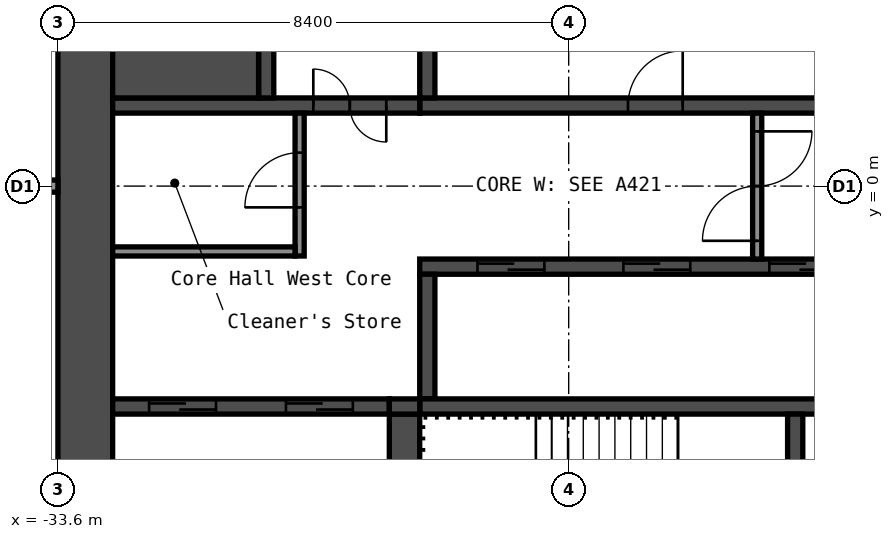
"""IFC4 building model, lengths in metres.
Left out: names, types, materials, properties, quantities, classifications, styles, units other than length and angle.
Written with IfcOpenShell. Run it as: python <this file> out.ifc"""

import sys

from ifc_helpers import new_model, si_unit, direction, frame, frame_2d, origin, place, context, subcontext, project, spatial, rectangle, extrude, element, fill, save


model = new_model("IFC4")
c1 = context("Model", 3, precision=1e-05, world=origin(), true_north=direction((0.0, 1.0)))
c2 = subcontext(c1, "Body", "Model", "MODEL_VIEW")
j1 = project(units=[si_unit("LENGTHUNIT", "METRE"), si_unit("PLANEANGLEUNIT", "RADIAN")], contexts=[c1])
p1 = place(None, origin())
s1 = spatial("IfcSite", under=j1, at=p1, CompositionType="ELEMENT")
p2 = place(p1, origin())
s2 = spatial("IfcBuilding", under=s1, at=p2, CompositionType="ELEMENT")
p3 = place(p2, frame((0.0, 0.0, 137.4)))
s3 = spatial("IfcBuildingStorey", under=s2, at=p3, CompositionType="ELEMENT", Elevation=137.4)
p4 = place(p3, frame((-33.15, -8.4, 0.0), z_axis=(0.0, 0.0, 1.0), x_axis=(0.0, 1.0, 0.0)))
e1 = element("IfcWall", 1, at=p4, inside=s3, PredefinedType="SHEAR", context=c2, shape_type="SweptSolid", body=[
    extrude(rectangle(XDim=16.8, YDim=0.9, at=frame_2d((8.4, 0.0))), origin(), (0.0, 0.0, 1.0), 2.75),
])
p5 = place(p3, frame((-27.65, 1.325, 0.0), z_axis=(0.0, 0.0, 1.0), x_axis=(1.0, 0.0, 0.0)))
e2 = element("IfcWall", 2, at=p5, inside=s3, PredefinedType="SHEAR", context=c2, shape_type="SweptSolid", body=[
    extrude(rectangle(XDim=7.5, YDim=0.25, at=frame_2d((3.75, 0.0))), origin(), (0.0, 0.0, 1.0), 2.75),
])
p6 = place(p5, frame((3.425, 0.0, 0.0)))
e3 = element("IfcOpeningElement", 3, at=p6, cuts=e2, PredefinedType="OPENING", context=c2, shape_type="SweptSolid", body=[
    extrude(rectangle(XDim=0.9, YDim=2.1, at=frame_2d((0.45, 1.05))), frame((0.0, 0.135, 0.0), z_axis=(0.0, -1.0, 0.0), x_axis=(1.0, 0.0, 0.0)), (0.0, 0.0, 1.0), 0.27),
])
p7 = place(p3, frame((-27.525, 1.45, 0.0), z_axis=(0.0, 0.0, 1.0), x_axis=(0.0, 1.0, 0.0)))
e4 = element("IfcWall", 4, at=p7, inside=s3, PredefinedType="SHEAR", context=c2, shape_type="SweptSolid", body=[
    extrude(rectangle(XDim=2.05, YDim=0.25, at=frame_2d((1.025, 0.0))), origin(), (0.0, 0.0, 1.0), 2.75),
])
p8 = place(p3, frame((-32.7, 1.325, 0.0), z_axis=(0.0, 0.0, 1.0), x_axis=(1.0, 0.0, 0.0)))
e5 = element("IfcWall", 5, at=p8, inside=s3, PredefinedType="SHEAR", context=c2, shape_type="SweptSolid", body=[
    extrude(rectangle(XDim=5.05, YDim=0.25, at=frame_2d((2.525, 0.0))), origin(), (0.0, 0.0, 1.0), 2.75),
])
p9 = place(p8, frame((3.3, 0.0, 0.0)))
e6 = element("IfcOpeningElement", 6, at=p9, cuts=e5, PredefinedType="OPENING", context=c2, shape_type="SweptSolid", body=[
    extrude(rectangle(XDim=1.2, YDim=2.1, at=frame_2d((0.6, 1.05))), frame((0.0, 0.135, 0.0), z_axis=(0.0, -1.0, 0.0), x_axis=(1.0, 0.0, 0.0)), (0.0, 0.0, 1.0), 0.27),
])
p10 = place(p3, frame((-30.175, 1.45, 0.0), z_axis=(0.0, 0.0, 1.0), x_axis=(0.0, 1.0, 0.0)))
e7 = element("IfcWall", 7, at=p10, inside=s3, PredefinedType="SHEAR", context=c2, shape_type="SweptSolid", body=[
    extrude(rectangle(XDim=6.05, YDim=0.25, at=frame_2d((3.025, 0.0))), origin(), (0.0, 0.0, 1.0), 2.75),
])
p11 = place(p10, frame((2.625, 0.0, 0.0)))
e8 = element("IfcOpeningElement", 8, at=p11, cuts=e7, PredefinedType="OPENING", context=c2, shape_type="SweptSolid", body=[
    extrude(rectangle(XDim=1.1, YDim=2.1, at=frame_2d((0.55, 1.05))), frame((0.0, 0.135, 0.0), z_axis=(0.0, -1.0, 0.0), x_axis=(1.0, 0.0, 0.0)), (0.0, 0.0, 1.0), 0.27),
])
p12 = place(p3, frame((-32.7, 2.375, 0.0), z_axis=(0.0, 0.0, 1.0), x_axis=(1.0, 0.0, 0.0)))
e9 = element("IfcWall", 9, at=p12, inside=s3, PredefinedType="SHEAR", context=c2, shape_type="SweptSolid", body=[
    extrude(rectangle(XDim=2.4, YDim=1.85, at=frame_2d((1.2, 0.0))), origin(), (0.0, 0.0, 1.0), 2.75),
])
p13 = place(p3, frame((-27.65, -1.325, 0.0), z_axis=(0.0, 0.0, 1.0), x_axis=(1.0, 0.0, 0.0)))
e10 = element("IfcWall", 10, at=p13, inside=s3, PredefinedType="SHEAR", context=c2, shape_type="SweptSolid", body=[
    extrude(rectangle(XDim=7.5, YDim=0.25, at=frame_2d((3.75, 0.0))), origin(), (0.0, 0.0, 1.0), 2.75),
])
p14 = place(p13, frame((5.75, 0.0, 0.0)))
e11 = element("IfcOpeningElement", 11, at=p14, cuts=e10, PredefinedType="OPENING", context=c2, shape_type="SweptSolid", body=[
    extrude(rectangle(XDim=1.1, YDim=2.1, at=frame_2d((0.55, 1.05))), frame((0.0, 0.135, 0.0), z_axis=(0.0, -1.0, 0.0), x_axis=(1.0, 0.0, 0.0)), (0.0, 0.0, 1.0), 0.27),
])
p15 = place(p13, frame((3.35, 0.0, 0.0)))
e12 = element("IfcOpeningElement", 12, at=p15, cuts=e10, PredefinedType="OPENING", context=c2, shape_type="SweptSolid", body=[
    extrude(rectangle(XDim=1.1, YDim=2.1, at=frame_2d((0.55, 1.05))), frame((0.0, 0.135, 0.0), z_axis=(0.0, -1.0, 0.0), x_axis=(1.0, 0.0, 0.0)), (0.0, 0.0, 1.0), 0.27),
])
p16 = place(p13, frame((0.95, 0.0, 0.0)))
e13 = element("IfcOpeningElement", 13, at=p16, cuts=e10, PredefinedType="OPENING", context=c2, shape_type="SweptSolid", body=[
    extrude(rectangle(XDim=1.1, YDim=2.1, at=frame_2d((0.55, 1.05))), frame((0.0, 0.135, 0.0), z_axis=(0.0, -1.0, 0.0), x_axis=(1.0, 0.0, 0.0)), (0.0, 0.0, 1.0), 0.27),
])
p17 = place(p3, frame((-27.525, -3.5, 0.0), z_axis=(0.0, 0.0, 1.0), x_axis=(0.0, 1.0, 0.0)))
e14 = element("IfcWall", 14, at=p17, inside=s3, PredefinedType="SHEAR", context=c2, shape_type="SweptSolid", body=[
    extrude(rectangle(XDim=2.05, YDim=0.25, at=frame_2d((1.025, 0.0))), origin(), (0.0, 0.0, 1.0), 2.75),
])
p18 = place(p3, frame((-27.65, -3.625, 0.0), z_axis=(0.0, 0.0, 1.0), x_axis=(1.0, 0.0, 0.0)))
e15 = element("IfcWall", 15, at=p18, inside=s3, PredefinedType="SHEAR", context=c2, shape_type="SweptSolid", body=[
    extrude(rectangle(XDim=7.5, YDim=0.25, at=frame_2d((3.75, 0.0))), origin(), (0.0, 0.0, 1.0), 2.75),
])
p19 = place(p3, frame((-21.475, -7.5, 0.0), z_axis=(0.0, 0.0, 1.0), x_axis=(0.0, 1.0, 0.0)))
e16 = element("IfcWall", 16, at=p19, inside=s3, PredefinedType="SHEAR", context=c2, shape_type="SweptSolid", body=[
    extrude(rectangle(XDim=3.75, YDim=0.25, at=frame_2d((1.875, 0.0))), origin(), (0.0, 0.0, 1.0), 2.75),
])
p20 = place(p19, frame((1.3, 0.0, 0.0)))
e17 = element("IfcOpeningElement", 17, at=p20, cuts=e16, PredefinedType="OPENING", context=c2, shape_type="SweptSolid", body=[
    extrude(rectangle(XDim=1.2, YDim=2.1, at=frame_2d((0.6, 1.05))), frame((0.0, 0.135, 0.0), z_axis=(0.0, -1.0, 0.0), x_axis=(1.0, 0.0, 0.0)), (0.0, 0.0, 1.0), 0.27),
])
p21 = place(p3, frame((-27.9, -7.5, 0.0), z_axis=(0.0, 0.0, 1.0), x_axis=(0.0, 1.0, 0.0)))
e18 = element("IfcWall", 18, at=p21, inside=s3, PredefinedType="SHEAR", context=c2, shape_type="SweptSolid", body=[
    extrude(rectangle(XDim=3.75, YDim=0.5, at=frame_2d((1.875, 0.0))), origin(), (0.0, 0.0, 1.0), 2.75),
])
p22 = place(p3, frame((-32.7, -3.625, 0.0), z_axis=(0.0, 0.0, 1.0), x_axis=(1.0, 0.0, 0.0)))
e19 = element("IfcWall", 19, at=p22, inside=s3, PredefinedType="SHEAR", context=c2, shape_type="SweptSolid", body=[
    extrude(rectangle(XDim=4.55, YDim=0.25, at=frame_2d((2.275, 0.0))), origin(), (0.0, 0.0, 1.0), 2.75),
])
p23 = place(p22, frame((2.85, 0.0, 0.0)))
e20 = element("IfcOpeningElement", 20, at=p23, cuts=e19, PredefinedType="OPENING", context=c2, shape_type="SweptSolid", body=[
    extrude(rectangle(XDim=1.1, YDim=2.1, at=frame_2d((0.55, 1.05))), frame((0.0, 0.135, 0.0), z_axis=(0.0, -1.0, 0.0), x_axis=(1.0, 0.0, 0.0)), (0.0, 0.0, 1.0), 0.27),
])
p24 = place(p22, frame((0.6, 0.0, 0.0)))
e21 = element("IfcOpeningElement", 21, at=p24, cuts=e19, PredefinedType="OPENING", context=c2, shape_type="SweptSolid", body=[
    extrude(rectangle(XDim=1.1, YDim=2.1, at=frame_2d((0.55, 1.05))), frame((0.0, 0.135, 0.0), z_axis=(0.0, -1.0, 0.0), x_axis=(1.0, 0.0, 0.0)), (0.0, 0.0, 1.0), 0.27),
])
p25 = place(p3, frame((-28.15, -3.625, 0.0), z_axis=(0.0, 0.0, 1.0), x_axis=(1.0, 0.0, 0.0)))
e22 = element("IfcWall", 22, at=p25, inside=s3, PredefinedType="SHEAR", context=c2, shape_type="SweptSolid", body=[
    extrude(rectangle(XDim=0.5, YDim=0.25, at=frame_2d((0.25, 0.0))), origin(), (0.0, 0.0, 1.0), 2.75),
])
p26 = place(p3, frame((-22.1, -1.2, 0.0), z_axis=(0.0, 0.0, 1.0), x_axis=(0.0, 1.0, 0.0)))
e23 = element("IfcWall", 23, at=p26, inside=s3, PredefinedType="PARTITIONING", context=c2, shape_type="SweptSolid", body=[
    extrude(rectangle(XDim=2.4, YDim=0.15, at=frame_2d((1.2, 0.0))), origin(), (0.0, 0.0, 1.0), 2.75),
])
p27 = place(p26, frame((0.3, 0.0, 0.0)))
e24 = element("IfcOpeningElement", 24, at=p27, cuts=e23, PredefinedType="OPENING", context=c2, shape_type="SweptSolid", body=[
    extrude(rectangle(XDim=1.8, YDim=2.1, at=frame_2d((0.9, 1.05))), frame((0.0, 0.085, 0.0), z_axis=(0.0, -1.0, 0.0), x_axis=(1.0, 0.0, 0.0)), (0.0, 0.0, 1.0), 0.17),
])
p28 = place(p3, frame((-29.625, -1.15, 0.0), z_axis=(0.0, 0.0, 1.0), x_axis=(0.0, 1.0, 0.0)))
e25 = element("IfcWall", 25, at=p28, inside=s3, PredefinedType="PARTITIONING", context=c2, shape_type="SweptSolid", body=[
    extrude(rectangle(XDim=2.35, YDim=0.15, at=frame_2d((1.175, 0.0))), origin(), (0.0, 0.0, 1.0), 2.75),
])
p29 = place(p28, frame((0.8, 0.0, 0.0)))
e26 = element("IfcOpeningElement", 26, at=p29, cuts=e25, PredefinedType="OPENING", context=c2, shape_type="SweptSolid", body=[
    extrude(rectangle(XDim=0.9, YDim=2.1, at=frame_2d((0.45, 1.05))), frame((0.0, 0.085, 0.0), z_axis=(0.0, -1.0, 0.0), x_axis=(1.0, 0.0, 0.0)), (0.0, 0.0, 1.0), 0.17),
])
p30 = place(p3, frame((-32.7, -1.075, 0.0), z_axis=(0.0, 0.0, 1.0), x_axis=(1.0, 0.0, 0.0)))
e27 = element("IfcWall", 27, at=p30, inside=s3, PredefinedType="PARTITIONING", context=c2, shape_type="SweptSolid", body=[
    extrude(rectangle(XDim=3.0, YDim=0.15, at=frame_2d((1.5, 0.0))), origin(), (0.0, 0.0, 1.0), 2.75),
])
p31 = place(p3, frame((-40.1, 0.0, 0.0), z_axis=(0.0, 0.0, 1.0), x_axis=(1.0, 0.0, 0.0)))
e28 = element("IfcWall", 28, at=p31, inside=s3, PredefinedType="PARTITIONING", context=c2, shape_type="SweptSolid", body=[
    extrude(rectangle(XDim=6.5, YDim=0.2, at=frame_2d((3.25, 0.0))), origin(), (0.0, 0.0, 1.0), 2.75),
])
p32 = place(p9, origin())
e29 = element("IfcDoor", 29, at=p32, inside=s3, OperationType="DOUBLE_DOOR_SINGLE_SWING", PredefinedType="DOOR", context=c2, shape_type="SweptSolid", body=[
    extrude(rectangle(XDim=1.2, YDim=2.1, at=frame_2d((0.6, 1.05))), frame((0.0, 0.025, 0.0), z_axis=(0.0, -1.0, 0.0), x_axis=(1.0, 0.0, 0.0)), (0.0, 0.0, 1.0), 0.05),
])
fill(e6, e29)
p33 = place(p27, origin())
e30 = element("IfcDoor", 30, at=p33, inside=s3, OperationType="DOUBLE_DOOR_SINGLE_SWING", PredefinedType="DOOR", context=c2, shape_type="SweptSolid", body=[
    extrude(rectangle(XDim=1.8, YDim=2.1, at=frame_2d((0.9, 1.05))), frame((0.0, 0.025, 0.0), z_axis=(0.0, -1.0, 0.0), x_axis=(1.0, 0.0, 0.0)), (0.0, 0.0, 1.0), 0.05),
])
fill(e24, e30)
p34 = place(p29, origin())
e31 = element("IfcDoor", 31, at=p34, inside=s3, OperationType="SINGLE_SWING_RIGHT", PredefinedType="DOOR", context=c2, shape_type="SweptSolid", body=[
    extrude(rectangle(XDim=0.9, YDim=2.1, at=frame_2d((0.45, 1.05))), frame((0.0, 0.025, 0.0), z_axis=(0.0, -1.0, 0.0), x_axis=(1.0, 0.0, 0.0)), (0.0, 0.0, 1.0), 0.05),
])
fill(e26, e31)
p35 = place(p6, origin())
e32 = element("IfcDoor", 32, at=p35, inside=s3, OperationType="SINGLE_SWING_LEFT", PredefinedType="DOOR", context=c2, shape_type="SweptSolid", body=[
    extrude(rectangle(XDim=0.9, YDim=2.1, at=frame_2d((0.45, 1.05))), frame((0.0, 0.025, 0.0), z_axis=(0.0, -1.0, 0.0), x_axis=(1.0, 0.0, 0.0)), (0.0, 0.0, 1.0), 0.05),
])
fill(e3, e32)
p36 = place(p14, origin())
e33 = element("IfcDoor", 33, at=p36, inside=s3, OperationType="DOUBLE_DOOR_SLIDING", PredefinedType="DOOR", context=c2, shape_type="SweptSolid", body=[
    extrude(rectangle(XDim=1.1, YDim=2.1, at=frame_2d((0.55, 1.05))), frame((0.0, 0.025, 0.0), z_axis=(0.0, -1.0, 0.0), x_axis=(1.0, 0.0, 0.0)), (0.0, 0.0, 1.0), 0.05),
])
fill(e11, e33)
p37 = place(p15, origin())
e34 = element("IfcDoor", 34, at=p37, inside=s3, OperationType="DOUBLE_DOOR_SLIDING", PredefinedType="DOOR", context=c2, shape_type="SweptSolid", body=[
    extrude(rectangle(XDim=1.1, YDim=2.1, at=frame_2d((0.55, 1.05))), frame((0.0, 0.025, 0.0), z_axis=(0.0, -1.0, 0.0), x_axis=(1.0, 0.0, 0.0)), (0.0, 0.0, 1.0), 0.05),
])
fill(e12, e34)
p38 = place(p16, origin())
e35 = element("IfcDoor", 35, at=p38, inside=s3, OperationType="DOUBLE_DOOR_SLIDING", PredefinedType="DOOR", context=c2, shape_type="SweptSolid", body=[
    extrude(rectangle(XDim=1.1, YDim=2.1, at=frame_2d((0.55, 1.05))), frame((0.0, 0.025, 0.0), z_axis=(0.0, -1.0, 0.0), x_axis=(1.0, 0.0, 0.0)), (0.0, 0.0, 1.0), 0.05),
])
fill(e13, e35)
p39 = place(p23, origin())
e36 = element("IfcDoor", 36, at=p39, inside=s3, OperationType="DOUBLE_DOOR_SLIDING", PredefinedType="DOOR", context=c2, shape_type="SweptSolid", body=[
    extrude(rectangle(XDim=1.1, YDim=2.1, at=frame_2d((0.55, 1.05))), frame((0.0, 0.025, 0.0), z_axis=(0.0, -1.0, 0.0), x_axis=(1.0, 0.0, 0.0)), (0.0, 0.0, 1.0), 0.05),
])
fill(e20, e36)
p40 = place(p24, origin())
e37 = element("IfcDoor", 37, at=p40, inside=s3, OperationType="DOUBLE_DOOR_SLIDING", PredefinedType="DOOR", context=c2, shape_type="SweptSolid", body=[
    extrude(rectangle(XDim=1.1, YDim=2.1, at=frame_2d((0.55, 1.05))), frame((0.0, 0.025, 0.0), z_axis=(0.0, -1.0, 0.0), x_axis=(1.0, 0.0, 0.0)), (0.0, 0.0, 1.0), 0.05),
])
fill(e21, e37)
save(model, sys.argv[1])
